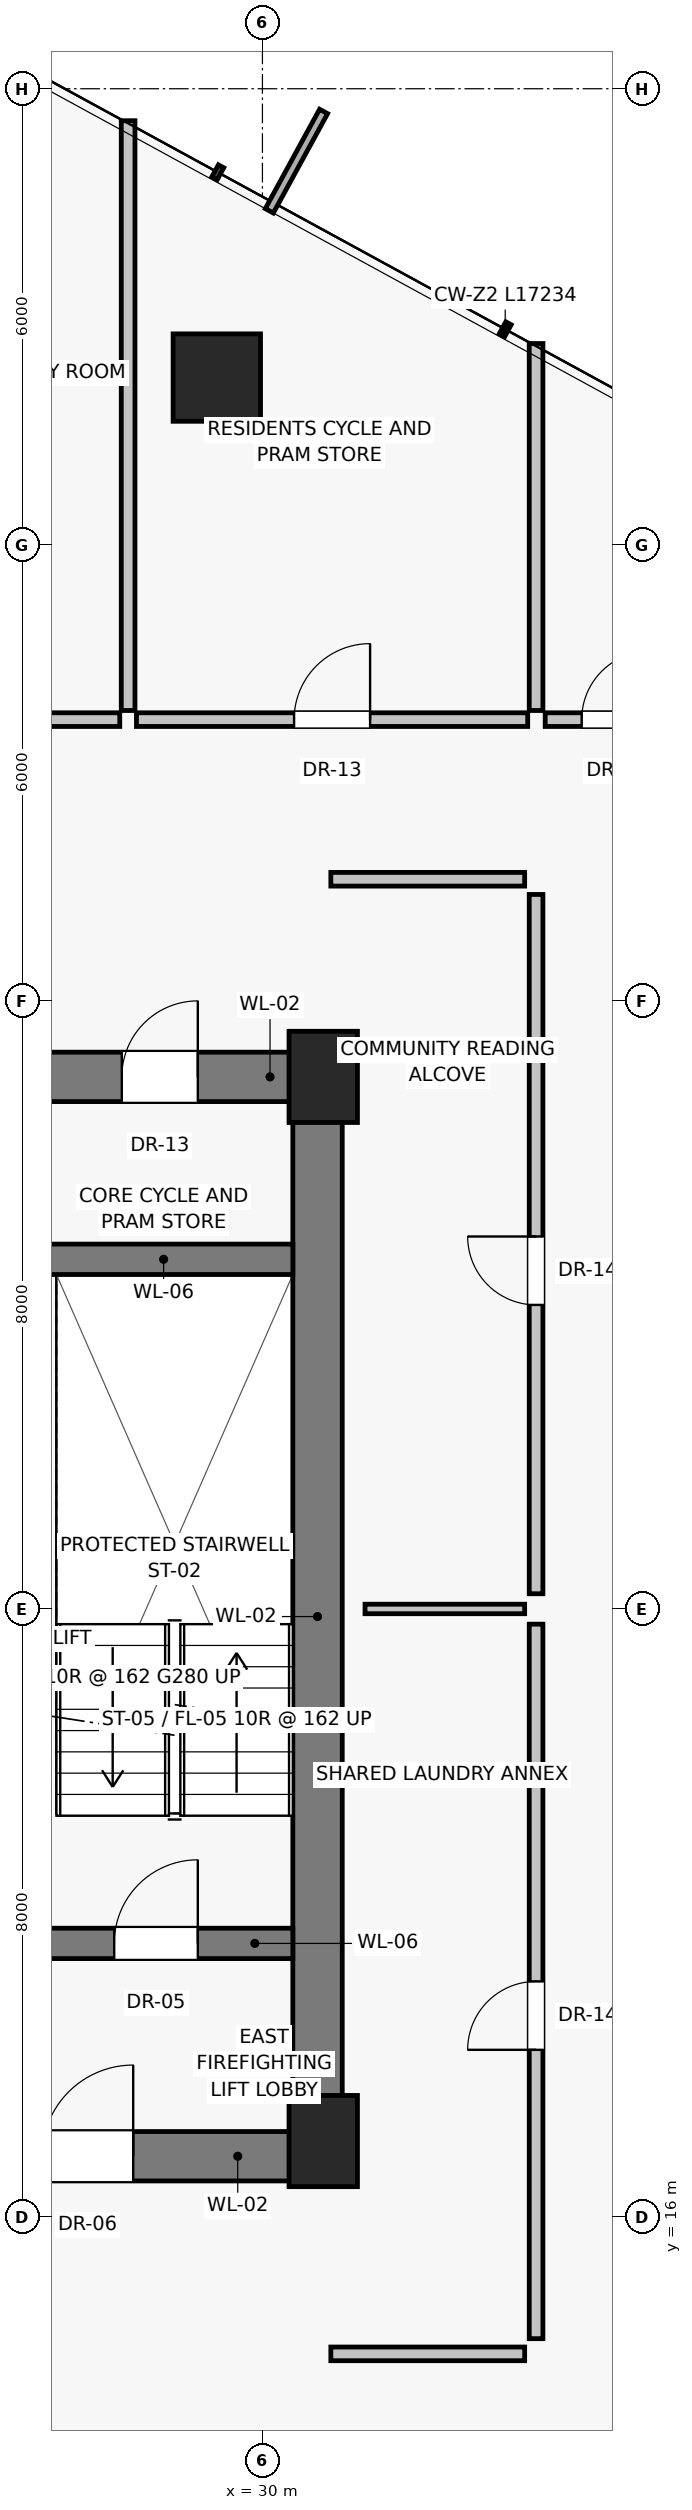
"""IFC4 building model, lengths in metres.
Left out: names, types, materials, properties, quantities, classifications, styles, units other than length and angle.
Written with IfcOpenShell. Run it as: python <this file> out.ifc"""

import sys

from ifc_helpers import new_model, si_unit, direction, frame, frame_2d, origin, origin_2d, place, context, subcontext, project, spatial, rectangle, extrude, source, transform, mapped, element, fill, save


model = new_model("IFC4")
c1 = context("Model", 3, precision=1e-05, world=origin(), true_north=direction((0.0, 1.0)))
c2 = subcontext(c1, "Body", "Model", "MODEL_VIEW")
j1 = project(units=[si_unit("LENGTHUNIT", "METRE"), si_unit("PLANEANGLEUNIT", "RADIAN")], contexts=[c1])
p1 = place(None, origin())
s1 = spatial("IfcSite", under=j1, at=p1, CompositionType="ELEMENT")
p2 = place(p1, origin())
s2 = spatial("IfcBuilding", under=s1, at=p2, CompositionType="ELEMENT")
p3 = place(p2, frame((0.0, 0.0, 132.75)))
s3 = spatial("IfcBuildingStorey", under=s2, at=p3, CompositionType="ELEMENT", Elevation=132.75)
for number, where, z_axis, x_axis in (
    (1, (30.8, 17.0, 0.0), (0.0, 0.0, 1.0), (1.0, 0.0, 0.0)),
    (2, (30.8, 31.0, 0.0), (0.0, 0.0, 1.0), (1.0, 0.0, 0.0)),
):
    element("IfcColumn", number, at=place(p3, frame(where, z_axis=z_axis, x_axis=x_axis)), inside=s3, PredefinedType="PILASTER", context=c2, shape_type="SweptSolid", body=[
        extrude(rectangle(XDim=0.9, YDim=1.2, at=origin_2d()), origin(), (0.0, 0.0, 1.0), 3.25),
    ])
p4 = place(p3, frame((29.4, 40.2, 0.0), z_axis=(0.0, 0.0, 1.0), x_axis=(1.0, 0.0, 0.0)))
e3 = element("IfcColumn", 3, at=p4, inside=s3, PredefinedType="COLUMN", context=c2, shape_type="SweptSolid", body=[
    extrude(rectangle(XDim=1.15, YDim=1.15, at=origin_2d()), origin(), (0.0, 0.0, 1.0), 3.25),
])
p5 = place(p3, frame((30.725, 16.8, 0.0), z_axis=(0.0, 0.0, 1.0), x_axis=(0.0, 1.0, 0.0)))
e4 = element("IfcWall", 4, at=p5, inside=s3, PredefinedType="SHEAR", context=c2, shape_type="SweptSolid", body=[
    extrude(rectangle(XDim=14.2, YDim=0.65, at=frame_2d((7.1, 0.0))), origin(), (0.0, 0.0, 1.0), 3.0),
])
p6 = place(p3, frame((24.95, 16.8, 0.0), z_axis=(0.0, 0.0, 1.0), x_axis=(1.0, 0.0, 0.0)))
e5 = element("IfcWall", 5, at=p6, inside=s3, PredefinedType="SHEAR", context=c2, shape_type="SweptSolid", body=[
    extrude(rectangle(XDim=5.85, YDim=0.65, at=frame_2d((2.925, 0.0))), origin(), (0.0, 0.0, 1.0), 3.0),
])
p7 = place(p6, frame((2.15, 0.0, 0.0)))
e6 = element("IfcOpeningElement", 6, at=p7, cuts=e5, PredefinedType="OPENING", context=c2, shape_type="SweptSolid", body=[
    extrude(rectangle(XDim=1.2, YDim=2.03, at=frame_2d((0.6, 1.015))), frame((0.0, 0.335, 0.0), z_axis=(0.0, -1.0, 0.0), x_axis=(1.0, 0.0, 0.0)), (0.0, 0.0, 1.0), 0.67),
])
p8 = place(p3, frame((27.0, 31.0, 0.0), z_axis=(0.0, 0.0, 1.0), x_axis=(1.0, 0.0, 0.0)))
e7 = element("IfcWall", 7, at=p8, inside=s3, PredefinedType="SHEAR", context=c2, shape_type="SweptSolid", body=[
    extrude(rectangle(XDim=3.8, YDim=0.65, at=frame_2d((1.9, 0.0))), origin(), (0.0, 0.0, 1.0), 3.0),
])
p9 = place(p8, frame((1.15, 0.0, 0.0)))
e8 = element("IfcOpeningElement", 8, at=p9, cuts=e7, PredefinedType="OPENING", context=c2, shape_type="SweptSolid", body=[
    extrude(rectangle(XDim=1.0, YDim=2.01, at=frame_2d((0.5, 1.005))), frame((0.0, 0.335, 0.0), z_axis=(0.0, -1.0, 0.0), x_axis=(1.0, 0.0, 0.0)), (0.0, 0.0, 1.0), 0.67),
])
p10 = place(p3, frame((27.0, 19.6, 0.0), z_axis=(0.0, 0.0, 1.0), x_axis=(1.0, 0.0, 0.0)))
e9 = element("IfcWall", 9, at=p10, inside=s3, PredefinedType="SHEAR", context=c2, shape_type="SweptSolid", body=[
    extrude(rectangle(XDim=3.4, YDim=0.4, at=frame_2d((1.7, 0.0))), origin(), (0.0, 0.0, 1.0), 3.0),
])
p11 = place(p10, frame((1.05, 0.0, 0.0)))
e10 = element("IfcOpeningElement", 10, at=p11, cuts=e9, PredefinedType="OPENING", context=c2, shape_type="SweptSolid", body=[
    extrude(rectangle(XDim=1.1, YDim=2.03, at=frame_2d((0.55, 1.015))), frame((0.0, 0.21, 0.0), z_axis=(0.0, -1.0, 0.0), x_axis=(1.0, 0.0, 0.0)), (0.0, 0.0, 1.0), 0.42),
])
p12 = place(p3, frame((27.0, 28.6, 0.0), z_axis=(0.0, 0.0, 1.0), x_axis=(1.0, 0.0, 0.0)))
e11 = element("IfcWall", 11, at=p12, inside=s3, PredefinedType="SHEAR", context=c2, shape_type="SweptSolid", body=[
    extrude(rectangle(XDim=3.4, YDim=0.4, at=frame_2d((1.7, 0.0))), origin(), (0.0, 0.0, 1.0), 3.0),
])
p13 = place(p3, frame((33.6, 14.4, 0.0), z_axis=(0.0, 0.0, 1.0), x_axis=(0.0, 1.0, 0.0)))
e12 = element("IfcWall", 12, at=p13, inside=s3, PredefinedType="PARTITIONING", context=c2, shape_type="SweptSolid", body=[
    extrude(rectangle(XDim=9.4, YDim=0.18, at=frame_2d((4.7, 0.0))), origin(), (0.0, 0.0, 1.0), 3.0),
])
p14 = place(p13, frame((3.8, 0.0, 0.0)))
e13 = element("IfcOpeningElement", 13, at=p14, cuts=e12, PredefinedType="OPENING", context=c2, shape_type="SweptSolid", body=[
    extrude(rectangle(XDim=0.9, YDim=2.01, at=frame_2d((0.45, 1.005))), frame((0.0, 0.1, 0.0), z_axis=(0.0, -1.0, 0.0), x_axis=(1.0, 0.0, 0.0)), (0.0, 0.0, 1.0), 0.2),
])
p15 = place(p3, frame((33.6, 24.2, 0.0), z_axis=(0.0, 0.0, 1.0), x_axis=(0.0, 1.0, 0.0)))
e14 = element("IfcWall", 14, at=p15, inside=s3, PredefinedType="PARTITIONING", context=c2, shape_type="SweptSolid", body=[
    extrude(rectangle(XDim=9.2, YDim=0.18, at=frame_2d((4.6, 0.0))), origin(), (0.0, 0.0, 1.0), 3.0),
])
p16 = place(p15, frame((3.8, 0.0, 0.0)))
e15 = element("IfcOpeningElement", 15, at=p16, cuts=e14, PredefinedType="OPENING", context=c2, shape_type="SweptSolid", body=[
    extrude(rectangle(XDim=0.9, YDim=2.01, at=frame_2d((0.45, 1.005))), frame((0.0, 0.1, 0.0), z_axis=(0.0, -1.0, 0.0), x_axis=(1.0, 0.0, 0.0)), (0.0, 0.0, 1.0), 0.2),
])
p17 = place(p3, frame((31.35, 24.0, 0.0), z_axis=(0.0, 0.0, 1.0), x_axis=(1.0, 0.0, 0.0)))
e16 = element("IfcWall", 16, at=p17, inside=s3, PredefinedType="PARTITIONING", context=c2, shape_type="SweptSolid", body=[
    extrude(rectangle(XDim=2.1, YDim=0.125, at=frame_2d((1.05, 0.0))), origin(), (0.0, 0.0, 1.0), 3.0),
])
for number, where, z_axis, x_axis in (
    (17, (30.9, 14.2, 0.0), (0.0, 0.0, 1.0), (1.0, 0.0, 0.0)),
    (18, (30.9, 33.6, 0.0), (0.0, 0.0, 1.0), (1.0, 0.0, 0.0)),
):
    element("IfcWall", number, at=place(p3, frame(where, z_axis=z_axis, x_axis=x_axis)), inside=s3, PredefinedType="PARTITIONING", context=c2, shape_type="SweptSolid", body=[
        extrude(rectangle(XDim=2.55, YDim=0.18, at=frame_2d((1.275, 0.0))), origin(), (0.0, 0.0, 1.0), 3.0),
    ])
p18 = place(p3, frame((33.6, 35.82, 0.0), z_axis=(0.0, 0.0, 1.0), x_axis=(0.0, 1.0, 0.0)))
e19 = element("IfcWall", 19, at=p18, inside=s3, PredefinedType="PARTITIONING", context=c2, shape_type="SweptSolid", body=[
    extrude(rectangle(XDim=4.828, YDim=0.18, at=frame_2d((2.414, 0.0))), origin(), (0.0, 0.0, 1.0), 3.0),
])
p19 = place(p3, frame((25.054, 35.7, 0.0), z_axis=(0.0, 0.0, 1.0), x_axis=(1.0, 0.0, 0.0)))
e20 = element("IfcWall", 20, at=p19, inside=s3, PredefinedType="PARTITIONING", context=c2, shape_type="SweptSolid", body=[
    extrude(rectangle(XDim=3.069, YDim=0.18, at=frame_2d((1.535, 0.0))), origin(), (0.0, 0.0, 1.0), 2.58),
])
p20 = place(p19, frame((1.034, 0.0, 0.0)))
e21 = element("IfcOpeningElement", 21, at=p20, cuts=e20, PredefinedType="OPENING", context=c2, shape_type="SweptSolid", body=[
    extrude(rectangle(XDim=1.0, YDim=2.01, at=frame_2d((0.5, 1.005))), frame((0.0, 0.1, 0.0), z_axis=(0.0, -1.0, 0.0), x_axis=(1.0, 0.0, 0.0)), (0.0, 0.0, 1.0), 0.2),
])
p21 = place(p3, frame((28.343, 35.7, 0.0), z_axis=(0.0, 0.0, 1.0), x_axis=(1.0, 0.0, 0.0)))
e22 = element("IfcWall", 22, at=p21, inside=s3, PredefinedType="PARTITIONING", context=c2, shape_type="SweptSolid", body=[
    extrude(rectangle(XDim=5.147, YDim=0.18, at=frame_2d((2.573, 0.0))), origin(), (0.0, 0.0, 1.0), 2.58),
])
p22 = place(p21, frame((2.073, 0.0, 0.0)))
e23 = element("IfcOpeningElement", 23, at=p22, cuts=e22, PredefinedType="OPENING", context=c2, shape_type="SweptSolid", body=[
    extrude(rectangle(XDim=1.0, YDim=2.01, at=frame_2d((0.5, 1.005))), frame((0.0, 0.1, 0.0), z_axis=(0.0, -1.0, 0.0), x_axis=(1.0, 0.0, 0.0)), (0.0, 0.0, 1.0), 0.2),
])
p23 = place(p3, frame((28.233, 35.82, 0.0), z_axis=(0.0, 0.0, 1.0), x_axis=(0.0, 1.0, 0.0)))
e24 = element("IfcWall", 24, at=p23, inside=s3, PredefinedType="PARTITIONING", context=c2, shape_type="SweptSolid", body=[
    extrude(rectangle(XDim=7.759, YDim=0.18, at=frame_2d((3.879, 0.0))), origin(), (0.0, 0.0, 1.0), 3.0),
])
p24 = place(p3, frame((33.72, 35.7, 0.0), z_axis=(0.0, 0.0, 1.0), x_axis=(1.0, 0.0, 0.0)))
e25 = element("IfcWall", 25, at=p24, inside=s3, PredefinedType="PARTITIONING", context=c2, shape_type="SweptSolid", body=[
    extrude(rectangle(XDim=1.86, YDim=0.18, at=frame_2d((0.93, 0.0))), origin(), (0.0, 0.0, 1.0), 3.0),
])
p25 = place(p24, frame((0.48, 0.0, 0.0)))
e26 = element("IfcOpeningElement", 26, at=p25, cuts=e25, PredefinedType="OPENING", context=c2, shape_type="SweptSolid", body=[
    extrude(rectangle(XDim=0.9, YDim=2.01, at=frame_2d((0.45, 1.005))), frame((0.0, 0.1, 0.0), z_axis=(0.0, -1.0, 0.0), x_axis=(1.0, 0.0, 0.0)), (0.0, 0.0, 1.0), 0.2),
])
m1 = source(origin(), c2, "Body", "SweptSolid", [
    extrude(rectangle(XDim=1.2, YDim=2.03, at=frame_2d((0.6, 1.015))), frame((0.0, 0.025, 0.0), z_axis=(0.0, -1.0, 0.0), x_axis=(1.0, 0.0, 0.0)), (0.0, 0.0, 1.0), 0.05),
])
p26 = place(p7, origin())
e27 = element("IfcDoor", 27, at=p26, inside=s3, OperationType="SINGLE_SWING_RIGHT", PredefinedType="DOOR", context=c2, shape_type="MappedRepresentation", body=[
    mapped(m1, transform((0.0, 0.0, 0.0), scale=1.0)),
])
fill(e6, e27)
m2 = source(origin(), c2, "Body", "SweptSolid", [
    extrude(rectangle(XDim=1.0, YDim=2.01, at=frame_2d((0.5, 1.005))), frame((0.0, 0.025, 0.0), z_axis=(0.0, -1.0, 0.0), x_axis=(1.0, 0.0, 0.0)), (0.0, 0.0, 1.0), 0.05),
])
p27 = place(p9, origin())
e28 = element("IfcDoor", 28, at=p27, inside=s3, OperationType="SINGLE_SWING_RIGHT", PredefinedType="DOOR", context=c2, shape_type="MappedRepresentation", body=[
    mapped(m2, transform((0.0, 0.0, 0.0), scale=1.0)),
])
fill(e8, e28)
m3 = source(origin(), c2, "Body", "SweptSolid", [
    extrude(rectangle(XDim=1.1, YDim=2.03, at=frame_2d((0.55, 1.015))), frame((0.0, 0.025, 0.0), z_axis=(0.0, -1.0, 0.0), x_axis=(1.0, 0.0, 0.0)), (0.0, 0.0, 1.0), 0.05),
])
p28 = place(p11, origin())
e29 = element("IfcDoor", 29, at=p28, inside=s3, OperationType="SINGLE_SWING_RIGHT", PredefinedType="DOOR", context=c2, shape_type="MappedRepresentation", body=[
    mapped(m3, transform((0.0, 0.0, 0.0), scale=1.0)),
])
fill(e10, e29)
m4 = source(origin(), c2, "Body", "SweptSolid", [
    extrude(rectangle(XDim=0.9, YDim=2.01, at=frame_2d((0.45, 1.005))), frame((0.0, 0.025, 0.0), z_axis=(0.0, -1.0, 0.0), x_axis=(1.0, 0.0, 0.0)), (0.0, 0.0, 1.0), 0.05),
])
p29 = place(p14, origin())
e30 = element("IfcDoor", 30, at=p29, inside=s3, OperationType="SINGLE_SWING_LEFT", PredefinedType="DOOR", context=c2, shape_type="MappedRepresentation", body=[
    mapped(m4, transform((0.0, 0.0, 0.0), scale=1.0)),
])
fill(e13, e30)
p30 = place(p16, origin())
e31 = element("IfcDoor", 31, at=p30, inside=s3, OperationType="SINGLE_SWING_RIGHT", PredefinedType="DOOR", context=c2, shape_type="MappedRepresentation", body=[
    mapped(m4, transform((0.0, 0.0, 0.0), scale=1.0)),
])
fill(e15, e31)
p31 = place(p22, origin())
e32 = element("IfcDoor", 32, at=p31, inside=s3, OperationType="SINGLE_SWING_RIGHT", PredefinedType="DOOR", context=c2, shape_type="MappedRepresentation", body=[
    mapped(m2, transform((0.0, 0.0, 0.0), scale=1.0)),
])
fill(e23, e32)
p32 = place(p25, origin())
e33 = element("IfcDoor", 33, at=p32, inside=s3, OperationType="SINGLE_SWING_RIGHT", PredefinedType="DOOR", context=c2, shape_type="MappedRepresentation", body=[
    mapped(m4, transform((0.0, 0.0, 0.0), scale=1.0)),
])
fill(e26, e33)
save(model, sys.argv[1])
